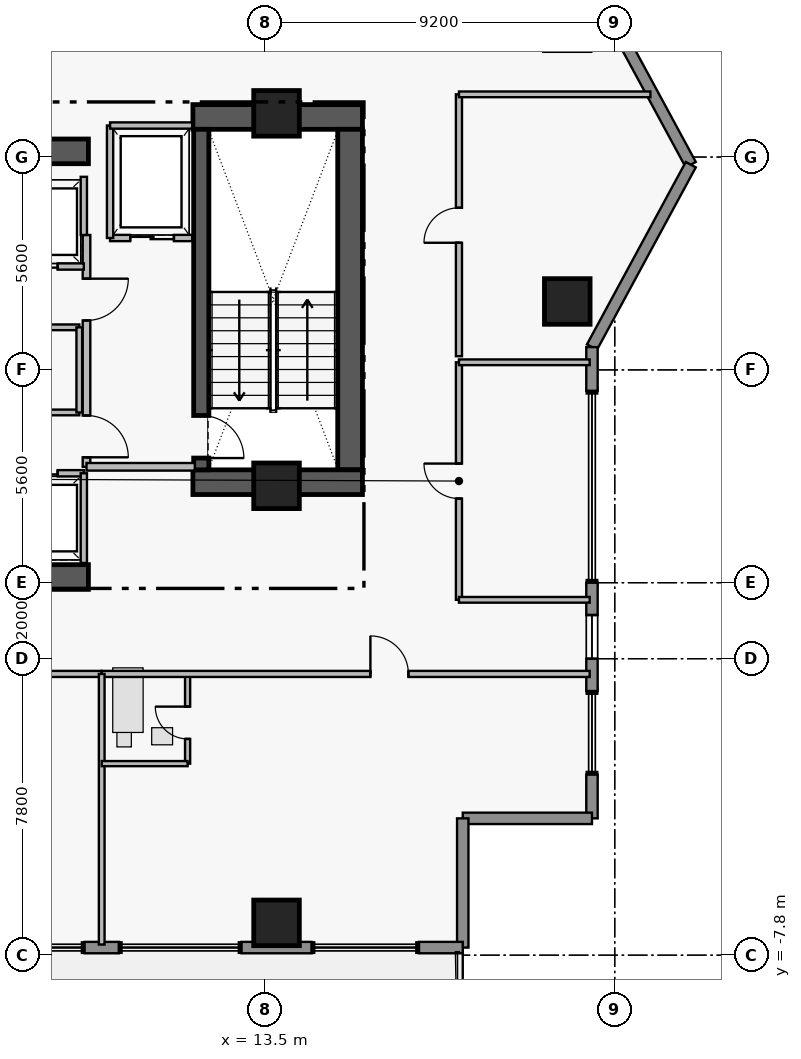
"""IFC4 building model, lengths in metres.
Left out: names, types, materials, properties, quantities, classifications, styles, units other than length and angle.
Written with IfcOpenShell. Run it as: python <this file> out.ifc"""

import sys

from ifc_helpers import new_model, si_unit, direction, frame, frame_2d, origin, origin_2d, place, context, subcontext, project, spatial, rectangle, extrude, element, fill, save


model = new_model("IFC4")
c1 = context("Model", 3, precision=1e-05, world=origin(), true_north=direction((0.0, 1.0)))
c2 = subcontext(c1, "Body", "Model", "MODEL_VIEW")
j1 = project(units=[si_unit("LENGTHUNIT", "METRE"), si_unit("PLANEANGLEUNIT", "RADIAN")], contexts=[c1])
p1 = place(None, origin())
s1 = spatial("IfcSite", under=j1, at=p1, CompositionType="ELEMENT")
p2 = place(p1, origin())
s2 = spatial("IfcBuilding", under=s1, at=p2, CompositionType="ELEMENT")
p3 = place(p2, frame((0.0, 0.0, 226.15)))
s3 = spatial("IfcBuildingStorey", under=s2, at=p3, CompositionType="ELEMENT", Elevation=226.15)
p4 = place(p3, frame((11.6, 14.255, 0.0), z_axis=(0.0, 0.0, 1.0), x_axis=(1.0, 0.0, 0.0)))
e1 = element("IfcWall", 1, at=p4, inside=s3, PredefinedType="SHEAR", context=c2, shape_type="SweptSolid", body=[
    extrude(rectangle(XDim=4.46, YDim=0.65, at=frame_2d((2.23, 0.0))), origin(), (0.0, 0.0, 1.0), 3.56),
])
p5 = place(p3, frame((15.735, 4.97, 0.0), z_axis=(0.0, 0.0, 1.0), x_axis=(0.0, 1.0, 0.0)))
e2 = element("IfcWall", 2, at=p5, inside=s3, PredefinedType="SHEAR", context=c2, shape_type="SweptSolid", body=[
    extrude(rectangle(XDim=8.96, YDim=0.65, at=frame_2d((4.48, 0.0))), origin(), (0.0, 0.0, 1.0), 3.56),
])
p6 = place(p3, frame((11.6, 4.645, 0.0), z_axis=(0.0, 0.0, 1.0), x_axis=(1.0, 0.0, 0.0)))
e3 = element("IfcWall", 3, at=p6, inside=s3, PredefinedType="SHEAR", context=c2, shape_type="SweptSolid", body=[
    extrude(rectangle(XDim=4.46, YDim=0.65, at=frame_2d((2.23, 0.0))), origin(), (0.0, 0.0, 1.0), 3.56),
])
for number, where, z_axis, x_axis in (
    (4, (1.25, 2.15, 0.0), (0.0, 0.0, 1.0), (1.0, 0.0, 0.0)),
    (5, (1.25, 13.35, 0.0), (0.0, 0.0, 1.0), (1.0, 0.0, 0.0)),
):
    element("IfcWall", number, at=place(p3, frame(where, z_axis=z_axis, x_axis=x_axis)), inside=s3, PredefinedType="SHEAR", context=c2, shape_type="SweptSolid", body=[
        extrude(rectangle(XDim=7.6, YDim=0.65, at=frame_2d((3.8, 0.0))), origin(), (0.0, 0.0, 1.0), 3.53),
    ])
p7 = place(p3, frame((11.82, 13.93, 0.0), z_axis=(0.0, 0.0, 1.0), x_axis=(0.0, -1.0, 0.0)))
e6 = element("IfcWall", 6, at=p7, inside=s3, PredefinedType="SHEAR", context=c2, shape_type="SweptSolid", body=[
    extrude(rectangle(XDim=8.96, YDim=0.4, at=frame_2d((4.48, 0.0))), origin(), (0.0, 0.0, 1.0), 3.56),
])
p8 = place(p7, frame((7.53, 0.0, 0.0)))
e7 = element("IfcOpeningElement", 7, at=p8, cuts=e6, PredefinedType="OPENING", context=c2, shape_type="SweptSolid", body=[
    extrude(rectangle(XDim=1.12, YDim=2.22, at=frame_2d((0.56, 1.11))), frame((0.0, 0.21, 0.0), z_axis=(0.0, -1.0, 0.0), x_axis=(1.0, 0.0, 0.0)), (0.0, 0.0, 1.0), 0.42),
])
for number, where, z_axis, x_axis in (
    (8, (13.8, 14.35, 0.0), (0.0, 0.0, 1.0), (1.0, 0.0, 0.0)),
    (9, (13.8, 4.55, 0.0), (0.0, 0.0, 1.0), (1.0, 0.0, 0.0)),
    (10, (13.8, -6.95, 0.0), (0.0, 0.0, 1.0), (1.0, 0.0, 0.0)),
    (11, (21.45, 9.4, 0.0), (0.0, 0.0, 1.0), (1.0, 0.0, 0.0)),
):
    element("IfcColumn", number, at=place(p3, frame(where, z_axis=z_axis, x_axis=x_axis)), inside=s3, PredefinedType="COLUMN", context=c2, shape_type="SweptSolid", body=[
        extrude(rectangle(XDim=1.2, YDim=1.2, at=origin_2d()), origin(), (0.0, 0.0, 1.0), 3.75),
    ])
for number, where, z_axis, x_axis in (
    (12, (22.1, 17.8, 0.0), (0.0, 0.0, 1.0), (0.476, -0.879, 0.0)),
    (13, (24.7, 13.0, 0.0), (0.0, 0.0, 1.0), (-0.476, -0.879, 0.0)),
):
    element("IfcWall", number, at=place(p3, frame(where, z_axis=z_axis, x_axis=x_axis)), inside=s3, PredefinedType="STANDARD", context=c2, shape_type="SweptSolid", body=[
        extrude(rectangle(XDim=5.459, YDim=0.3, at=frame_2d((2.729, 0.0))), origin(), (0.0, 0.0, 1.0), 3.53),
    ])
p9 = place(p3, frame((22.1, 8.2, 0.0), z_axis=(0.0, 0.0, 1.0), x_axis=(0.0, -1.0, 0.0)))
e14 = element("IfcWall", 14, at=p9, inside=s3, PredefinedType="STANDARD", context=c2, shape_type="SweptSolid", body=[
    extrude(rectangle(XDim=1.15, YDim=0.3, at=frame_2d((0.575, 0.0))), origin(), (0.0, 0.0, 1.0), 3.53),
])
p10 = place(p3, frame((22.1, 2.0, 0.0), z_axis=(0.0, 0.0, 1.0), x_axis=(0.0, -1.0, 0.0)))
e15 = element("IfcWall", 15, at=p10, inside=s3, PredefinedType="STANDARD", context=c2, shape_type="SweptSolid", body=[
    extrude(rectangle(XDim=2.85, YDim=0.3, at=frame_2d((1.425, 0.0))), origin(), (0.0, 0.0, 1.0), 3.53),
])
p11 = place(p10, frame((0.85, 0.0, 0.95)))
e16 = element("IfcOpeningElement", 16, at=p11, cuts=e15, PredefinedType="OPENING", context=c2, shape_type="SweptSolid", body=[
    extrude(rectangle(XDim=1.15, YDim=1.55, at=frame_2d((0.575, 0.775))), frame((0.0, 0.16, 0.0), z_axis=(0.0, -1.0, 0.0), x_axis=(1.0, 0.0, 0.0)), (0.0, 0.0, 1.0), 0.32),
])
p12 = place(p3, frame((22.1, -3.05, 0.0), z_axis=(0.0, 0.0, 1.0), x_axis=(0.0, -1.0, 0.0)))
e17 = element("IfcWall", 17, at=p12, inside=s3, PredefinedType="STANDARD", context=c2, shape_type="SweptSolid", body=[
    extrude(rectangle(XDim=1.15, YDim=0.3, at=frame_2d((0.575, 0.0))), origin(), (0.0, 0.0, 1.0), 3.53),
])
for number, where, z_axis, x_axis in (
    (18, (22.1, -4.2, 0.0), (0.0, 0.0, 1.0), (-1.0, 0.0, 0.0)),
    (19, (18.7, -4.2, 0.0), (0.0, 0.0, 1.0), (0.0, -1.0, 0.0)),
):
    element("IfcWall", number, at=place(p3, frame(where, z_axis=z_axis, x_axis=x_axis)), inside=s3, PredefinedType="STANDARD", context=c2, shape_type="SweptSolid", body=[
        extrude(rectangle(XDim=3.4, YDim=0.3, at=frame_2d((1.7, 0.0))), origin(), (0.0, 0.0, 1.0), 3.53),
    ])
p13 = place(p3, frame((18.7, -7.6, 0.0), z_axis=(0.0, 0.0, 1.0), x_axis=(-1.0, 0.0, 0.0)))
e20 = element("IfcWall", 20, at=p13, inside=s3, PredefinedType="STANDARD", context=c2, shape_type="SweptSolid", body=[
    extrude(rectangle(XDim=1.15, YDim=0.3, at=frame_2d((0.575, 0.0))), origin(), (0.0, 0.0, 1.0), 3.53),
])
p14 = place(p3, frame((14.72, -7.6, 0.0), z_axis=(0.0, 0.0, 1.0), x_axis=(-1.0, 0.0, 0.0)))
e21 = element("IfcWall", 21, at=p14, inside=s3, PredefinedType="STANDARD", context=c2, shape_type="SweptSolid", body=[
    extrude(rectangle(XDim=1.84, YDim=0.3, at=frame_2d((0.92, 0.0))), origin(), (0.0, 0.0, 1.0), 3.53),
])
p15 = place(p3, frame((9.65, -7.6, 0.0), z_axis=(0.0, 0.0, 1.0), x_axis=(-1.0, 0.0, 0.0)))
e22 = element("IfcWall", 22, at=p15, inside=s3, PredefinedType="STANDARD", context=c2, shape_type="SweptSolid", body=[
    extrude(rectangle(XDim=0.9, YDim=0.3, at=frame_2d((0.45, 0.0))), origin(), (0.0, 0.0, 1.0), 3.53),
])
p16 = place(p3, frame((8.8, 11.15, 0.0), z_axis=(0.0, 0.0, 1.0), x_axis=(0.0, -1.0, 0.0)))
e23 = element("IfcWall", 23, at=p16, inside=s3, PredefinedType="PARTITIONING", context=c2, shape_type="SweptSolid", body=[
    extrude(rectangle(XDim=6.1, YDim=0.2, at=frame_2d((3.05, 0.0))), origin(), (0.0, 0.0, 1.0), 3.53),
])
p17 = place(p16, frame((1.15, 0.0, 0.0)))
e24 = element("IfcOpeningElement", 24, at=p17, cuts=e23, PredefinedType="OPENING", context=c2, shape_type="SweptSolid", body=[
    extrude(rectangle(XDim=1.1, YDim=2.2, at=frame_2d((0.55, 1.1))), frame((0.0, 0.11, 0.0), z_axis=(0.0, -1.0, 0.0), x_axis=(1.0, 0.0, 0.0)), (0.0, 0.0, 1.0), 0.22),
])
p18 = place(p16, frame((4.75, 0.0, 0.0)))
e25 = element("IfcOpeningElement", 25, at=p18, cuts=e23, PredefinedType="OPENING", context=c2, shape_type="SweptSolid", body=[
    extrude(rectangle(XDim=1.1, YDim=2.2, at=frame_2d((0.55, 1.1))), frame((0.0, 0.11, 0.0), z_axis=(0.0, -1.0, 0.0), x_axis=(1.0, 0.0, 0.0)), (0.0, 0.0, 1.0), 0.22),
])
p19 = place(p3, frame((9.42, 11.07, 0.0), z_axis=(0.0, 0.0, 1.0), x_axis=(1.0, 0.0, 0.0)))
e26 = element("IfcWall", 26, at=p19, inside=s3, PredefinedType="PARTITIONING", context=c2, shape_type="SweptSolid", body=[
    extrude(rectangle(XDim=2.16, YDim=0.165, at=frame_2d((1.08, 0.0))), origin(), (0.0, 0.0, 1.0), 3.53),
])
p20 = place(p19, frame((0.53, 0.0, 0.0)))
e27 = element("IfcOpeningElement", 27, at=p20, cuts=e26, PredefinedType="OPENING", context=c2, shape_type="SweptSolid", body=[
    extrude(rectangle(XDim=1.15, YDim=2.25, at=frame_2d((0.575, 1.125))), frame((0.0, 0.093, 0.0), z_axis=(0.0, -1.0, 0.0), x_axis=(1.0, 0.0, 0.0)), (0.0, 0.0, 1.0), 0.185),
])
p21 = place(p3, frame((6.25, 4.88, 0.0), z_axis=(0.0, 0.0, 1.0), x_axis=(1.0, 0.0, 0.0)))
e28 = element("IfcWall", 28, at=p21, inside=s3, PredefinedType="PARTITIONING", context=c2, shape_type="SweptSolid", body=[
    extrude(rectangle(XDim=2.48, YDim=0.165, at=frame_2d((1.24, 0.0))), origin(), (0.0, 0.0, 1.0), 3.53),
])
p22 = place(p21, frame((0.69, 0.0, 0.0)))
e29 = element("IfcOpeningElement", 29, at=p22, cuts=e28, PredefinedType="OPENING", context=c2, shape_type="SweptSolid", body=[
    extrude(rectangle(XDim=1.1, YDim=2.25, at=frame_2d((0.55, 1.125))), frame((0.0, 0.093, 0.0), z_axis=(0.0, -1.0, 0.0), x_axis=(1.0, 0.0, 0.0)), (0.0, 0.0, 1.0), 0.185),
])
p23 = place(p3, frame((6.25, 10.32, 0.0), z_axis=(0.0, 0.0, 1.0), x_axis=(1.0, 0.0, 0.0)))
e30 = element("IfcWall", 30, at=p23, inside=s3, PredefinedType="PARTITIONING", context=c2, shape_type="SweptSolid", body=[
    extrude(rectangle(XDim=2.48, YDim=0.165, at=frame_2d((1.24, 0.0))), origin(), (0.0, 0.0, 1.0), 3.53),
])
p24 = place(p23, frame((0.69, 0.0, 0.0)))
e31 = element("IfcOpeningElement", 31, at=p24, cuts=e30, PredefinedType="OPENING", context=c2, shape_type="SweptSolid", body=[
    extrude(rectangle(XDim=1.1, YDim=2.25, at=frame_2d((0.55, 1.125))), frame((0.0, 0.093, 0.0), z_axis=(0.0, -1.0, 0.0), x_axis=(1.0, 0.0, 0.0)), (0.0, 0.0, 1.0), 0.185),
])
p25 = place(p3, frame((4.29, 6.48, 0.0), z_axis=(0.0, 0.0, 1.0), x_axis=(1.0, 0.0, 0.0)))
e32 = element("IfcWall", 32, at=p25, inside=s3, PredefinedType="PARTITIONING", context=c2, shape_type="SweptSolid", body=[
    extrude(rectangle(XDim=4.32, YDim=0.15, at=frame_2d((2.16, 0.0))), origin(), (0.0, 0.0, 1.0), 3.53),
])
p26 = place(p25, frame((1.71, 0.0, 0.0)))
e33 = element("IfcOpeningElement", 33, at=p26, cuts=e32, PredefinedType="OPENING", context=c2, shape_type="SweptSolid", body=[
    extrude(rectangle(XDim=0.9, YDim=2.15, at=frame_2d((0.45, 1.075))), frame((0.0, 0.085, 0.0), z_axis=(0.0, -1.0, 0.0), x_axis=(1.0, 0.0, 0.0)), (0.0, 0.0, 1.0), 0.17),
])
p27 = place(p3, frame((0.0, -0.4, 0.0), z_axis=(0.0, 0.0, 1.0), x_axis=(1.0, 0.0, 0.0)))
e34 = element("IfcWall", 34, at=p27, inside=s3, PredefinedType="PARTITIONING", context=c2, shape_type="SweptSolid", body=[
    extrude(rectangle(XDim=9.2, YDim=0.16, at=frame_2d((4.6, 0.0))), origin(), (0.0, 0.0, 1.0), 3.53),
])
p28 = place(p27, frame((5.25, 0.0, 0.0)))
e35 = element("IfcOpeningElement", 35, at=p28, cuts=e34, PredefinedType="OPENING", context=c2, shape_type="SweptSolid", body=[
    extrude(rectangle(XDim=1.0, YDim=2.15, at=frame_2d((0.5, 1.075))), frame((0.0, 0.09, 0.0), z_axis=(0.0, -1.0, 0.0), x_axis=(1.0, 0.0, 0.0)), (0.0, 0.0, 1.0), 0.18),
])
p29 = place(p3, frame((11.46, -2.76, 0.0), z_axis=(0.0, 0.0, 1.0), x_axis=(0.0, 1.0, 0.0)))
e36 = element("IfcWall", 36, at=p29, inside=s3, PredefinedType="PLUMBINGWALL", context=c2, shape_type="SweptSolid", body=[
    extrude(rectangle(XDim=2.36, YDim=0.135, at=frame_2d((1.18, 0.0))), origin(), (0.0, 0.0, 1.0), 3.53),
])
p30 = place(p29, frame((0.65, 0.0, 0.0)))
e37 = element("IfcOpeningElement", 37, at=p30, cuts=e36, PredefinedType="OPENING", context=c2, shape_type="SweptSolid", body=[
    extrude(rectangle(XDim=0.85, YDim=2.1, at=frame_2d((0.425, 1.05))), frame((0.0, 0.077, 0.0), z_axis=(0.0, -1.0, 0.0), x_axis=(1.0, 0.0, 0.0)), (0.0, 0.0, 1.0), 0.155),
])
p31 = place(p3, frame((9.2, -0.4, 0.0), z_axis=(0.0, 0.0, 1.0), x_axis=(1.0, 0.0, 0.0)))
e38 = element("IfcWall", 38, at=p31, inside=s3, PredefinedType="PARTITIONING", context=c2, shape_type="SweptSolid", body=[
    extrude(rectangle(XDim=12.84, YDim=0.16, at=frame_2d((6.42, 0.0))), origin(), (0.0, 0.0, 1.0), 3.53),
])
p32 = place(p31, frame((7.07, 0.0, 0.0)))
e39 = element("IfcOpeningElement", 39, at=p32, cuts=e38, PredefinedType="OPENING", context=c2, shape_type="SweptSolid", body=[
    extrude(rectangle(XDim=1.0, YDim=2.15, at=frame_2d((0.5, 1.075))), frame((0.0, 0.09, 0.0), z_axis=(0.0, -1.0, 0.0), x_axis=(1.0, 0.0, 0.0)), (0.0, 0.0, 1.0), 0.18),
])
p33 = place(p3, frame((18.6, 1.55, 0.0), z_axis=(0.0, 0.0, 1.0), x_axis=(0.0, 1.0, 0.0)))
e40 = element("IfcWall", 40, at=p33, inside=s3, PredefinedType="PARTITIONING", context=c2, shape_type="SweptSolid", body=[
    extrude(rectangle(XDim=6.25, YDim=0.16, at=frame_2d((3.125, 0.0))), origin(), (0.0, 0.0, 1.0), 3.53),
])
p34 = place(p33, frame((2.665, 0.0, 0.0)))
e41 = element("IfcOpeningElement", 41, at=p34, cuts=e40, PredefinedType="OPENING", context=c2, shape_type="SweptSolid", body=[
    extrude(rectangle(XDim=0.92, YDim=2.12, at=frame_2d((0.46, 1.06))), frame((0.0, 0.09, 0.0), z_axis=(0.0, -1.0, 0.0), x_axis=(1.0, 0.0, 0.0)), (0.0, 0.0, 1.0), 0.18),
])
p35 = place(p3, frame((18.6, 7.96, 0.0), z_axis=(0.0, 0.0, 1.0), x_axis=(0.0, 1.0, 0.0)))
e42 = element("IfcWall", 42, at=p35, inside=s3, PredefinedType="PARTITIONING", context=c2, shape_type="SweptSolid", body=[
    extrude(rectangle(XDim=6.89, YDim=0.16, at=frame_2d((3.445, 0.0))), origin(), (0.0, 0.0, 1.0), 3.53),
])
p36 = place(p35, frame((2.985, 0.0, 0.0)))
e43 = element("IfcOpeningElement", 43, at=p36, cuts=e42, PredefinedType="OPENING", context=c2, shape_type="SweptSolid", body=[
    extrude(rectangle(XDim=0.92, YDim=2.12, at=frame_2d((0.46, 1.06))), frame((0.0, 0.09, 0.0), z_axis=(0.0, -1.0, 0.0), x_axis=(1.0, 0.0, 0.0)), (0.0, 0.0, 1.0), 0.18),
])
p37 = place(p3, frame((8.8, 5.05, 0.0), z_axis=(0.0, 0.0, 1.0), x_axis=(1.0, 0.0, 0.0)))
e44 = element("IfcWall", 44, at=p37, inside=s3, PredefinedType="PARTITIONING", context=c2, shape_type="SweptSolid", body=[
    extrude(rectangle(XDim=2.85, YDim=0.2, at=frame_2d((1.425, 0.0))), origin(), (0.0, 0.0, 1.0), 3.53),
])
p38 = place(p3, frame((9.42, 11.07, 0.0), z_axis=(0.0, 0.0, 1.0), x_axis=(0.0, 1.0, 0.0)))
e45 = element("IfcWall", 45, at=p38, inside=s3, PredefinedType="PARTITIONING", context=c2, shape_type="SweptSolid", body=[
    extrude(rectangle(XDim=2.96, YDim=0.165, at=frame_2d((1.48, 0.0))), origin(), (0.0, 0.0, 1.0), 3.53),
])
p39 = place(p3, frame((9.42, 14.03, 0.0), z_axis=(0.0, 0.0, 1.0), x_axis=(1.0, 0.0, 0.0)))
e46 = element("IfcWall", 46, at=p39, inside=s3, PredefinedType="PARTITIONING", context=c2, shape_type="SweptSolid", body=[
    extrude(rectangle(XDim=2.16, YDim=0.165, at=frame_2d((1.08, 0.0))), origin(), (0.0, 0.0, 1.0), 3.53),
])
p40 = place(p3, frame((8.73, 2.52, 0.0), z_axis=(0.0, 0.0, 1.0), x_axis=(0.0, 1.0, 0.0)))
e47 = element("IfcWall", 47, at=p40, inside=s3, PredefinedType="PARTITIONING", context=c2, shape_type="SweptSolid", body=[
    extrude(rectangle(XDim=2.36, YDim=0.165, at=frame_2d((1.18, 0.0))), origin(), (0.0, 0.0, 1.0), 3.53),
])
p41 = place(p3, frame((8.73, 11.15, 0.0), z_axis=(0.0, 0.0, 1.0), x_axis=(0.0, 1.0, 0.0)))
e48 = element("IfcWall", 48, at=p41, inside=s3, PredefinedType="PARTITIONING", context=c2, shape_type="SweptSolid", body=[
    extrude(rectangle(XDim=1.53, YDim=0.165, at=frame_2d((0.765, 0.0))), origin(), (0.0, 0.0, 1.0), 3.53),
])
p42 = place(p3, frame((4.29, 8.72, 0.0), z_axis=(0.0, 0.0, 1.0), x_axis=(1.0, 0.0, 0.0)))
e49 = element("IfcWall", 49, at=p42, inside=s3, PredefinedType="PARTITIONING", context=c2, shape_type="SweptSolid", body=[
    extrude(rectangle(XDim=4.32, YDim=0.15, at=frame_2d((2.16, 0.0))), origin(), (0.0, 0.0, 1.0), 3.53),
])
p43 = place(p3, frame((8.61, 6.48, 0.0), z_axis=(0.0, 0.0, 1.0), x_axis=(0.0, 1.0, 0.0)))
e50 = element("IfcWall", 50, at=p43, inside=s3, PredefinedType="PARTITIONING", context=c2, shape_type="SweptSolid", body=[
    extrude(rectangle(XDim=2.24, YDim=0.15, at=frame_2d((1.12, 0.0))), origin(), (0.0, 0.0, 1.0), 3.53),
])
p44 = place(p3, frame((9.2, -7.52, 0.0), z_axis=(0.0, 0.0, 1.0), x_axis=(0.0, 1.0, 0.0)))
e51 = element("IfcWall", 51, at=p44, inside=s3, PredefinedType="PARTITIONING", context=c2, shape_type="SweptSolid", body=[
    extrude(rectangle(XDim=7.12, YDim=0.15, at=frame_2d((3.56, 0.0))), origin(), (0.0, 0.0, 1.0), 3.53),
])
p45 = place(p3, frame((9.2, -2.76, 0.0), z_axis=(0.0, 0.0, 1.0), x_axis=(1.0, 0.0, 0.0)))
e52 = element("IfcWall", 52, at=p45, inside=s3, PredefinedType="PLUMBINGWALL", context=c2, shape_type="SweptSolid", body=[
    extrude(rectangle(XDim=2.26, YDim=0.135, at=frame_2d((1.13, 0.0))), origin(), (0.0, 0.0, 1.0), 3.124),
])
for number, where, z_axis, x_axis in (
    (53, (18.6, 1.55, 0.0), (0.0, 0.0, 1.0), (1.0, 0.0, 0.0)),
    (54, (18.6, 7.8, 0.0), (0.0, 0.0, 1.0), (1.0, 0.0, 0.0)),
):
    element("IfcWall", number, at=place(p3, frame(where, z_axis=z_axis, x_axis=x_axis)), inside=s3, PredefinedType="PARTITIONING", context=c2, shape_type="SweptSolid", body=[
        extrude(rectangle(XDim=3.44, YDim=0.15, at=frame_2d((1.72, 0.0))), origin(), (0.0, 0.0, 1.0), 3.53),
    ])
p46 = place(p3, frame((18.6, 14.85, 0.0), z_axis=(0.0, 0.0, 1.0), x_axis=(1.0, 0.0, 0.0)))
e55 = element("IfcWall", 55, at=p46, inside=s3, PredefinedType="PARTITIONING", context=c2, shape_type="SweptSolid", body=[
    extrude(rectangle(XDim=5.038, YDim=0.15, at=frame_2d((2.519, 0.0))), origin(), (0.0, 0.0, 1.0), 3.53),
])
p47 = place(p11, origin())
e56 = element("IfcWindow", 56, at=p47, inside=s3, PartitioningType="SINGLE_PANEL", PredefinedType="WINDOW", context=c2, shape_type="SweptSolid", body=[
    extrude(rectangle(XDim=1.15, YDim=1.55, at=frame_2d((0.575, 0.775))), frame((0.0, 0.03, 0.0), z_axis=(0.0, -1.0, 0.0), x_axis=(1.0, 0.0, 0.0)), (0.0, 0.0, 1.0), 0.06),
])
fill(e16, e56)
p48 = place(p8, origin())
e57 = element("IfcDoor", 57, at=p48, inside=s3, OperationType="SINGLE_SWING_RIGHT", PredefinedType="DOOR", context=c2, shape_type="SweptSolid", body=[
    extrude(rectangle(XDim=1.12, YDim=2.22, at=frame_2d((0.56, 1.11))), frame((0.0, 0.025, 0.0), z_axis=(0.0, -1.0, 0.0), x_axis=(1.0, 0.0, 0.0)), (0.0, 0.0, 1.0), 0.05),
])
fill(e7, e57)
p49 = place(p17, origin())
e58 = element("IfcDoor", 58, at=p49, inside=s3, OperationType="SINGLE_SWING_LEFT", PredefinedType="DOOR", context=c2, shape_type="SweptSolid", body=[
    extrude(rectangle(XDim=1.1, YDim=2.2, at=frame_2d((0.55, 1.1))), frame((0.0, 0.025, 0.0), z_axis=(0.0, -1.0, 0.0), x_axis=(1.0, 0.0, 0.0)), (0.0, 0.0, 1.0), 0.05),
])
fill(e24, e58)
p50 = place(p18, origin())
e59 = element("IfcDoor", 59, at=p50, inside=s3, OperationType="SINGLE_SWING_RIGHT", PredefinedType="DOOR", context=c2, shape_type="SweptSolid", body=[
    extrude(rectangle(XDim=1.1, YDim=2.2, at=frame_2d((0.55, 1.1))), frame((0.0, 0.025, 0.0), z_axis=(0.0, -1.0, 0.0), x_axis=(1.0, 0.0, 0.0)), (0.0, 0.0, 1.0), 0.05),
])
fill(e25, e59)
p51 = place(p20, origin())
e60 = element("IfcDoor", 60, at=p51, inside=s3, OperationType="SLIDING_TO_LEFT", PredefinedType="DOOR", context=c2, shape_type="SweptSolid", body=[
    extrude(rectangle(XDim=1.15, YDim=2.25, at=frame_2d((0.575, 1.125))), frame((0.0, 0.025, 0.0), z_axis=(0.0, -1.0, 0.0), x_axis=(1.0, 0.0, 0.0)), (0.0, 0.0, 1.0), 0.05),
])
fill(e27, e60)
p52 = place(p22, origin())
e61 = element("IfcDoor", 61, at=p52, inside=s3, OperationType="SLIDING_TO_LEFT", PredefinedType="DOOR", context=c2, shape_type="SweptSolid", body=[
    extrude(rectangle(XDim=1.1, YDim=2.25, at=frame_2d((0.55, 1.125))), frame((0.0, 0.025, 0.0), z_axis=(0.0, -1.0, 0.0), x_axis=(1.0, 0.0, 0.0)), (0.0, 0.0, 1.0), 0.05),
])
fill(e29, e61)
p53 = place(p24, origin())
e62 = element("IfcDoor", 62, at=p53, inside=s3, OperationType="SLIDING_TO_LEFT", PredefinedType="DOOR", context=c2, shape_type="SweptSolid", body=[
    extrude(rectangle(XDim=1.1, YDim=2.25, at=frame_2d((0.55, 1.125))), frame((0.0, 0.025, 0.0), z_axis=(0.0, -1.0, 0.0), x_axis=(1.0, 0.0, 0.0)), (0.0, 0.0, 1.0), 0.05),
])
fill(e31, e62)
p54 = place(p30, origin())
e63 = element("IfcDoor", 63, at=p54, inside=s3, OperationType="SINGLE_SWING_RIGHT", PredefinedType="DOOR", context=c2, shape_type="SweptSolid", body=[
    extrude(rectangle(XDim=0.85, YDim=2.1, at=frame_2d((0.425, 1.05))), frame((0.0, 0.025, 0.0), z_axis=(0.0, -1.0, 0.0), x_axis=(1.0, 0.0, 0.0)), (0.0, 0.0, 1.0), 0.05),
])
fill(e37, e63)
p55 = place(p32, origin())
e64 = element("IfcDoor", 64, at=p55, inside=s3, OperationType="SINGLE_SWING_LEFT", PredefinedType="DOOR", context=c2, shape_type="SweptSolid", body=[
    extrude(rectangle(XDim=1.0, YDim=2.15, at=frame_2d((0.5, 1.075))), frame((0.0, 0.025, 0.0), z_axis=(0.0, -1.0, 0.0), x_axis=(1.0, 0.0, 0.0)), (0.0, 0.0, 1.0), 0.05),
])
fill(e39, e64)
p56 = place(p34, origin())
e65 = element("IfcDoor", 65, at=p56, inside=s3, OperationType="SINGLE_SWING_RIGHT", PredefinedType="DOOR", context=c2, shape_type="SweptSolid", body=[
    extrude(rectangle(XDim=0.92, YDim=2.12, at=frame_2d((0.46, 1.06))), frame((0.0, 0.025, 0.0), z_axis=(0.0, -1.0, 0.0), x_axis=(1.0, 0.0, 0.0)), (0.0, 0.0, 1.0), 0.05),
])
fill(e41, e65)
p57 = place(p36, origin())
e66 = element("IfcDoor", 66, at=p57, inside=s3, OperationType="SINGLE_SWING_LEFT", PredefinedType="DOOR", context=c2, shape_type="SweptSolid", body=[
    extrude(rectangle(XDim=0.92, YDim=2.12, at=frame_2d((0.46, 1.06))), frame((0.0, 0.025, 0.0), z_axis=(0.0, -1.0, 0.0), x_axis=(1.0, 0.0, 0.0)), (0.0, 0.0, 1.0), 0.05),
])
fill(e43, e66)
save(model, sys.argv[1])
